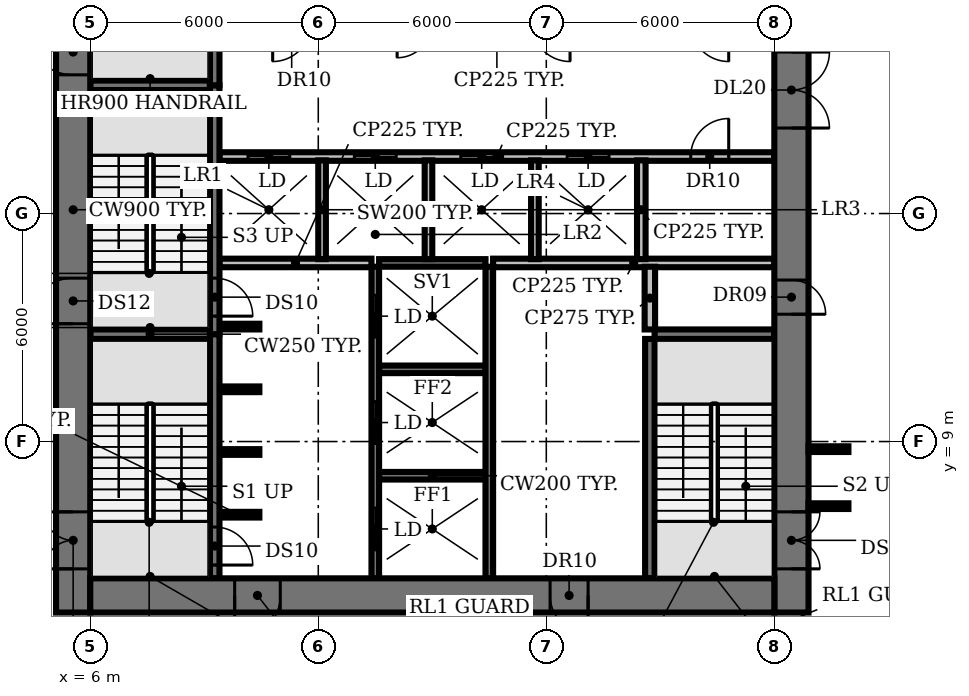
"""IFC4 building model, lengths in metres.
Left out: names, types, materials, properties, quantities, classifications, styles, units other than length and angle.
Written with IfcOpenShell. Run it as: python <this file> out.ifc"""

import sys

from ifc_helpers import new_model, si_unit, direction, frame, frame_2d, origin, place, context, subcontext, project, spatial, rectangle, extrude, element, fill, save


model = new_model("IFC4")
c1 = context("Model", 3, precision=1e-05, world=origin(), true_north=direction((0.0, 1.0)))
c2 = subcontext(c1, "Body", "Model", "MODEL_VIEW")
j1 = project(units=[si_unit("LENGTHUNIT", "METRE"), si_unit("PLANEANGLEUNIT", "RADIAN")], contexts=[c1])
p1 = place(None, origin())
s1 = spatial("IfcSite", under=j1, at=p1, CompositionType="ELEMENT")
p2 = place(p1, origin())
s2 = spatial("IfcBuilding", under=s1, at=p2, CompositionType="ELEMENT")
p3 = place(p2, frame((0.0, 0.0, 79.4)))
s3 = spatial("IfcBuildingStorey", under=s2, at=p3, CompositionType="ELEMENT", Elevation=79.4)
p4 = place(p3, frame((9.4, 7.075, 0.0), z_axis=(0.0, 0.0, 1.0), x_axis=(1.0, 0.0, 0.0)))
e1 = element("IfcWall", 1, at=p4, inside=s3, PredefinedType="SHEAR", context=c2, shape_type="SweptSolid", body=[
    extrude(rectangle(XDim=1.05, YDim=0.15, at=frame_2d((0.525, 0.0))), origin(), (0.0, 0.0, 1.0), 8.05),
])
p5 = place(p3, frame((13.6, 8.1, 0.0), z_axis=(0.0, 0.0, 1.0), x_axis=(1.0, 0.0, 0.0)))
e2 = element("IfcWall", 2, at=p5, inside=s3, PredefinedType="SHEAR", context=c2, shape_type="SweptSolid", body=[
    extrude(rectangle(XDim=2.8, YDim=0.2, at=frame_2d((1.4, 0.0))), origin(), (0.0, 0.0, 1.0), 8.05),
])
for number, where, z_axis, x_axis in (
    (3, (9.4, 8.725, 0.0), (0.0, 0.0, 1.0), (1.0, 0.0, 0.0)),
    (4, (9.4, 10.375, 0.0), (0.0, 0.0, 1.0), (1.0, 0.0, 0.0)),
):
    element("IfcWall", number, at=place(p3, frame(where, z_axis=z_axis, x_axis=x_axis)), inside=s3, PredefinedType="SHEAR", context=c2, shape_type="SweptSolid", body=[
        extrude(rectangle(XDim=1.05, YDim=0.15, at=frame_2d((0.525, 0.0))), origin(), (0.0, 0.0, 1.0), 8.05),
    ])
p6 = place(p3, frame((13.6, 10.9, 0.0), z_axis=(0.0, 0.0, 1.0), x_axis=(1.0, 0.0, 0.0)))
e5 = element("IfcWall", 5, at=p6, inside=s3, PredefinedType="SHEAR", context=c2, shape_type="SweptSolid", body=[
    extrude(rectangle(XDim=2.8, YDim=0.2, at=frame_2d((1.4, 0.0))), origin(), (0.0, 0.0, 1.0), 8.05),
])
for number, where, z_axis, x_axis in (
    (6, (6.0, 11.825, 0.0), (0.0, 0.0, 1.0), (1.0, 0.0, 0.0)),
    (7, (20.85, 11.825, 0.0), (0.0, 0.0, 1.0), (1.0, 0.0, 0.0)),
):
    element("IfcWall", number, at=place(p3, frame(where, z_axis=z_axis, x_axis=x_axis)), inside=s3, PredefinedType="SHEAR", context=c2, shape_type="SweptSolid", body=[
        extrude(rectangle(XDim=3.15, YDim=0.25, at=frame_2d((1.575, 0.0))), origin(), (0.0, 0.0, 1.0), 8.05),
    ])
p7 = place(p3, frame((9.4, 12.025, 0.0), z_axis=(0.0, 0.0, 1.0), x_axis=(1.0, 0.0, 0.0)))
e8 = element("IfcWall", 8, at=p7, inside=s3, PredefinedType="SHEAR", context=c2, shape_type="SweptSolid", body=[
    extrude(rectangle(XDim=1.05, YDim=0.15, at=frame_2d((0.525, 0.0))), origin(), (0.0, 0.0, 1.0), 8.05),
])
p8 = place(p3, frame((9.4, 13.7, 0.0), z_axis=(0.0, 0.0, 1.0), x_axis=(1.0, 0.0, 0.0)))
e9 = element("IfcWall", 9, at=p8, inside=s3, PredefinedType="PARTITIONING", context=c2, shape_type="SweptSolid", body=[
    extrude(rectangle(XDim=4.0, YDim=0.225, at=frame_2d((2.0, 0.0))), origin(), (0.0, 0.0, 1.0), 8.05),
])
p9 = place(p3, frame((13.6, 13.7, 0.0), z_axis=(0.0, 0.0, 1.0), x_axis=(1.0, 0.0, 0.0)))
e10 = element("IfcWall", 10, at=p9, inside=s3, PredefinedType="SHEAR", context=c2, shape_type="SweptSolid", body=[
    extrude(rectangle(XDim=2.8, YDim=0.2, at=frame_2d((1.4, 0.0))), origin(), (0.0, 0.0, 1.0), 8.05),
])
p10 = place(p3, frame((16.6, 13.7, 0.0), z_axis=(0.0, 0.0, 1.0), x_axis=(1.0, 0.0, 0.0)))
e11 = element("IfcWall", 11, at=p10, inside=s3, PredefinedType="PARTITIONING", context=c2, shape_type="SweptSolid", body=[
    extrude(rectangle(XDim=7.4, YDim=0.225, at=frame_2d((3.7, 0.0))), origin(), (0.0, 0.0, 1.0), 8.05),
])
p11 = place(p3, frame((9.4, 16.5, 0.0), z_axis=(0.0, 0.0, 1.0), x_axis=(1.0, 0.0, 0.0)))
e12 = element("IfcWall", 12, at=p11, inside=s3, PredefinedType="PARTITIONING", context=c2, shape_type="SweptSolid", body=[
    extrude(rectangle(XDim=14.6, YDim=0.225, at=frame_2d((7.3, 0.0))), origin(), (0.0, 0.0, 1.0), 8.05),
])
p12 = place(p11, frame((0.75, 0.0, 0.0)))
e13 = element("IfcOpeningElement", 13, at=p12, cuts=e12, PredefinedType="OPENING", context=c2, shape_type="SweptSolid", body=[
    extrude(rectangle(XDim=1.1, YDim=2.1, at=frame_2d((0.55, 1.05))), frame((0.0, 0.123, 0.0), z_axis=(0.0, -1.0, 0.0), x_axis=(1.0, 0.0, 0.0)), (0.0, 0.0, 1.0), 0.245),
])
p13 = place(p11, frame((3.55, 0.0, 0.0)))
e14 = element("IfcOpeningElement", 14, at=p13, cuts=e12, PredefinedType="OPENING", context=c2, shape_type="SweptSolid", body=[
    extrude(rectangle(XDim=1.1, YDim=2.1, at=frame_2d((0.55, 1.05))), frame((0.0, 0.123, 0.0), z_axis=(0.0, -1.0, 0.0), x_axis=(1.0, 0.0, 0.0)), (0.0, 0.0, 1.0), 0.245),
])
p14 = place(p11, frame((6.35, 0.0, 0.0)))
e15 = element("IfcOpeningElement", 15, at=p14, cuts=e12, PredefinedType="OPENING", context=c2, shape_type="SweptSolid", body=[
    extrude(rectangle(XDim=1.1, YDim=2.1, at=frame_2d((0.55, 1.05))), frame((0.0, 0.123, 0.0), z_axis=(0.0, -1.0, 0.0), x_axis=(1.0, 0.0, 0.0)), (0.0, 0.0, 1.0), 0.245),
])
p15 = place(p11, frame((9.15, 0.0, 0.0)))
e16 = element("IfcOpeningElement", 16, at=p15, cuts=e12, PredefinedType="OPENING", context=c2, shape_type="SweptSolid", body=[
    extrude(rectangle(XDim=1.1, YDim=2.1, at=frame_2d((0.55, 1.05))), frame((0.0, 0.123, 0.0), z_axis=(0.0, -1.0, 0.0), x_axis=(1.0, 0.0, 0.0)), (0.0, 0.0, 1.0), 0.245),
])
p16 = place(p11, frame((12.4, 0.0, 0.0)))
e17 = element("IfcOpeningElement", 17, at=p16, cuts=e12, PredefinedType="OPENING", context=c2, shape_type="SweptSolid", body=[
    extrude(rectangle(XDim=1.0, YDim=2.1, at=frame_2d((0.5, 1.05))), frame((0.0, 0.123, 0.0), z_axis=(0.0, -1.0, 0.0), x_axis=(1.0, 0.0, 0.0)), (0.0, 0.0, 1.0), 0.245),
])
p17 = place(p3, frame((6.0, 18.375, 0.0), z_axis=(0.0, 0.0, 1.0), x_axis=(1.0, 0.0, 0.0)))
e18 = element("IfcWall", 18, at=p17, inside=s3, PredefinedType="SHEAR", context=c2, shape_type="SweptSolid", body=[
    extrude(rectangle(XDim=3.15, YDim=0.25, at=frame_2d((1.575, 0.0))), origin(), (0.0, 0.0, 1.0), 8.05),
])
p18 = place(p3, frame((9.275, 11.825, 0.0), z_axis=(0.0, 0.0, 1.0), x_axis=(0.0, -1.0, 0.0)))
e19 = element("IfcWall", 19, at=p18, inside=s3, PredefinedType="SHEAR", context=c2, shape_type="SweptSolid", body=[
    extrude(rectangle(XDim=6.425, YDim=0.25, at=frame_2d((3.212, 0.0))), origin(), (0.0, 0.0, 1.0), 8.05),
])
p19 = place(p18, frame((5.075, 0.0, 0.0)))
e20 = element("IfcOpeningElement", 20, at=p19, cuts=e19, PredefinedType="OPENING", context=c2, shape_type="SweptSolid", body=[
    extrude(rectangle(XDim=1.0, YDim=2.1, at=frame_2d((0.5, 1.05))), frame((0.0, 0.135, 0.0), z_axis=(0.0, -1.0, 0.0), x_axis=(1.0, 0.0, 0.0)), (0.0, 0.0, 1.0), 0.27),
])
p20 = place(p3, frame((9.275, 18.375, 0.0), z_axis=(0.0, 0.0, 1.0), x_axis=(0.0, -1.0, 0.0)))
e21 = element("IfcWall", 21, at=p20, inside=s3, PredefinedType="SHEAR", context=c2, shape_type="SweptSolid", body=[
    extrude(rectangle(XDim=6.55, YDim=0.25, at=frame_2d((3.275, 0.0))), origin(), (0.0, 0.0, 1.0), 8.05),
])
p21 = place(p20, frame((5.075, 0.0, 0.0)))
e22 = element("IfcOpeningElement", 22, at=p21, cuts=e21, PredefinedType="OPENING", context=c2, shape_type="SweptSolid", body=[
    extrude(rectangle(XDim=1.0, YDim=2.1, at=frame_2d((0.5, 1.05))), frame((0.0, 0.135, 0.0), z_axis=(0.0, -1.0, 0.0), x_axis=(1.0, 0.0, 0.0)), (0.0, 0.0, 1.0), 0.27),
])
p22 = place(p3, frame((9.275, 18.375, 0.0), z_axis=(0.0, 0.0, 1.0), x_axis=(0.0, 1.0, 0.0)))
e23 = element("IfcWall", 23, at=p22, inside=s3, PredefinedType="SHEAR", context=c2, shape_type="SweptSolid", body=[
    extrude(rectangle(XDim=6.425, YDim=0.25, at=frame_2d((3.212, 0.0))), origin(), (0.0, 0.0, 1.0), 8.05),
])
p23 = place(p3, frame((12.1, 13.8, 0.0), z_axis=(0.0, 0.0, 1.0), x_axis=(0.0, 1.0, 0.0)))
e24 = element("IfcWall", 24, at=p23, inside=s3, PredefinedType="SOLIDWALL", context=c2, shape_type="SweptSolid", body=[
    extrude(rectangle(XDim=2.6, YDim=0.2, at=frame_2d((1.3, 0.0))), origin(), (0.0, 0.0, 1.0), 8.05),
])
p24 = place(p3, frame((13.5, 5.4, 0.0), z_axis=(0.0, 0.0, 1.0), x_axis=(0.0, 1.0, 0.0)))
e25 = element("IfcWall", 25, at=p24, inside=s3, PredefinedType="SHEAR", context=c2, shape_type="SweptSolid", body=[
    extrude(rectangle(XDim=8.2, YDim=0.2, at=frame_2d((4.1, 0.0))), origin(), (0.0, 0.0, 1.0), 8.05),
])
p25 = place(p24, frame((0.75, 0.0, 0.0)))
e26 = element("IfcOpeningElement", 26, at=p25, cuts=e25, PredefinedType="OPENING", context=c2, shape_type="SweptSolid", body=[
    extrude(rectangle(XDim=1.1, YDim=2.1, at=frame_2d((0.55, 1.05))), frame((0.0, 0.11, 0.0), z_axis=(0.0, -1.0, 0.0), x_axis=(1.0, 0.0, 0.0)), (0.0, 0.0, 1.0), 0.22),
])
p26 = place(p24, frame((3.55, 0.0, 0.0)))
e27 = element("IfcOpeningElement", 27, at=p26, cuts=e25, PredefinedType="OPENING", context=c2, shape_type="SweptSolid", body=[
    extrude(rectangle(XDim=1.1, YDim=2.1, at=frame_2d((0.55, 1.05))), frame((0.0, 0.11, 0.0), z_axis=(0.0, -1.0, 0.0), x_axis=(1.0, 0.0, 0.0)), (0.0, 0.0, 1.0), 0.22),
])
p27 = place(p24, frame((6.35, 0.0, 0.0)))
e28 = element("IfcOpeningElement", 28, at=p27, cuts=e25, PredefinedType="OPENING", context=c2, shape_type="SweptSolid", body=[
    extrude(rectangle(XDim=1.1, YDim=2.1, at=frame_2d((0.55, 1.05))), frame((0.0, 0.11, 0.0), z_axis=(0.0, -1.0, 0.0), x_axis=(1.0, 0.0, 0.0)), (0.0, 0.0, 1.0), 0.22),
])
p28 = place(p3, frame((14.9, 13.8, 0.0), z_axis=(0.0, 0.0, 1.0), x_axis=(0.0, 1.0, 0.0)))
e29 = element("IfcWall", 29, at=p28, inside=s3, PredefinedType="SOLIDWALL", context=c2, shape_type="SweptSolid", body=[
    extrude(rectangle(XDim=2.6, YDim=0.2, at=frame_2d((1.3, 0.0))), origin(), (0.0, 0.0, 1.0), 8.05),
])
p29 = place(p3, frame((16.5, 5.4, 0.0), z_axis=(0.0, 0.0, 1.0), x_axis=(0.0, 1.0, 0.0)))
e30 = element("IfcWall", 30, at=p29, inside=s3, PredefinedType="SHEAR", context=c2, shape_type="SweptSolid", body=[
    extrude(rectangle(XDim=8.2, YDim=0.2, at=frame_2d((4.1, 0.0))), origin(), (0.0, 0.0, 1.0), 8.05),
])
p30 = place(p3, frame((17.7, 13.8, 0.0), z_axis=(0.0, 0.0, 1.0), x_axis=(0.0, 1.0, 0.0)))
e31 = element("IfcWall", 31, at=p30, inside=s3, PredefinedType="SOLIDWALL", context=c2, shape_type="SweptSolid", body=[
    extrude(rectangle(XDim=2.6, YDim=0.2, at=frame_2d((1.3, 0.0))), origin(), (0.0, 0.0, 1.0), 8.05),
])
p31 = place(p3, frame((20.5, 13.8, 0.0), z_axis=(0.0, 0.0, 1.0), x_axis=(0.0, 1.0, 0.0)))
e32 = element("IfcWall", 32, at=p31, inside=s3, PredefinedType="PARTITIONING", context=c2, shape_type="SweptSolid", body=[
    extrude(rectangle(XDim=2.6, YDim=0.225, at=frame_2d((1.3, 0.0))), origin(), (0.0, 0.0, 1.0), 8.05),
])
p32 = place(p3, frame((20.725, 5.4, 0.0), z_axis=(0.0, 0.0, 1.0), x_axis=(0.0, 1.0, 0.0)))
e33 = element("IfcWall", 33, at=p32, inside=s3, PredefinedType="SHEAR", context=c2, shape_type="SweptSolid", body=[
    extrude(rectangle(XDim=6.3, YDim=0.25, at=frame_2d((3.15, 0.0))), origin(), (0.0, 0.0, 1.0), 8.05),
])
p33 = place(p3, frame((20.725, 11.95, 0.0), z_axis=(0.0, 0.0, 1.0), x_axis=(0.0, 1.0, 0.0)))
e34 = element("IfcWall", 34, at=p33, inside=s3, PredefinedType="PARTITIONING", context=c2, shape_type="SweptSolid", body=[
    extrude(rectangle(XDim=1.65, YDim=0.275, at=frame_2d((0.825, 0.0))), origin(), (0.0, 0.0, 1.0), 8.05),
])
p34 = place(p3, frame((5.55, 4.5, 0.0), z_axis=(0.0, 0.0, 1.0), x_axis=(0.0, 1.0, 0.0)))
e35 = element("IfcWall", 35, at=p34, inside=s3, PredefinedType="SHEAR", context=c2, shape_type="SweptSolid", body=[
    extrude(rectangle(XDim=21.2, YDim=0.9, at=frame_2d((10.6, 0.0))), origin(), (0.0, 0.0, 1.0), 8.05),
])
p35 = place(p34, frame((1.15, 0.0, 0.0)))
e36 = element("IfcOpeningElement", 36, at=p35, cuts=e35, PredefinedType="OPENING", context=c2, shape_type="SweptSolid", body=[
    extrude(rectangle(XDim=1.5, YDim=2.1, at=frame_2d((0.75, 1.05))), frame((0.0, 0.46, 0.0), z_axis=(0.0, -1.0, 0.0), x_axis=(1.0, 0.0, 0.0)), (0.0, 0.0, 1.0), 0.92),
])
p36 = place(p34, frame((7.6, 0.0, 0.0)))
e37 = element("IfcOpeningElement", 37, at=p36, cuts=e35, PredefinedType="OPENING", context=c2, shape_type="SweptSolid", body=[
    extrude(rectangle(XDim=1.2, YDim=2.1, at=frame_2d((0.6, 1.05))), frame((0.0, 0.46, 0.0), z_axis=(0.0, -1.0, 0.0), x_axis=(1.0, 0.0, 0.0)), (0.0, 0.0, 1.0), 0.92),
])
p37 = place(p34, frame((14.15, 0.0, 0.0)))
e38 = element("IfcOpeningElement", 38, at=p37, cuts=e35, PredefinedType="OPENING", context=c2, shape_type="SweptSolid", body=[
    extrude(rectangle(XDim=1.2, YDim=2.1, at=frame_2d((0.6, 1.05))), frame((0.0, 0.46, 0.0), z_axis=(0.0, -1.0, 0.0), x_axis=(1.0, 0.0, 0.0)), (0.0, 0.0, 1.0), 0.92),
])
p38 = place(p3, frame((24.45, 25.7, 0.0), z_axis=(0.0, 0.0, 1.0), x_axis=(0.0, -1.0, 0.0)))
e39 = element("IfcWall", 39, at=p38, inside=s3, PredefinedType="SHEAR", context=c2, shape_type="SweptSolid", body=[
    extrude(rectangle(XDim=21.2, YDim=0.9, at=frame_2d((10.6, 0.0))), origin(), (0.0, 0.0, 1.0), 8.05),
])
p39 = place(p38, frame((18.55, 0.0, 0.0)))
e40 = element("IfcOpeningElement", 40, at=p39, cuts=e39, PredefinedType="OPENING", context=c2, shape_type="SweptSolid", body=[
    extrude(rectangle(XDim=1.5, YDim=2.1, at=frame_2d((0.75, 1.05))), frame((0.0, 0.46, 0.0), z_axis=(0.0, -1.0, 0.0), x_axis=(1.0, 0.0, 0.0)), (0.0, 0.0, 1.0), 0.92),
])
p40 = place(p38, frame((12.45, 0.0, 0.0)))
e41 = element("IfcOpeningElement", 41, at=p40, cuts=e39, PredefinedType="OPENING", context=c2, shape_type="SweptSolid", body=[
    extrude(rectangle(XDim=0.9, YDim=2.1, at=frame_2d((0.45, 1.05))), frame((0.0, 0.46, 0.0), z_axis=(0.0, -1.0, 0.0), x_axis=(1.0, 0.0, 0.0)), (0.0, 0.0, 1.0), 0.92),
])
p41 = place(p38, frame((6.45, 0.0, 0.0)))
e42 = element("IfcOpeningElement", 42, at=p41, cuts=e39, PredefinedType="OPENING", context=c2, shape_type="SweptSolid", body=[
    extrude(rectangle(XDim=2.0, YDim=2.1, at=frame_2d((1.0, 1.05))), frame((0.0, 0.46, 0.0), z_axis=(0.0, -1.0, 0.0), x_axis=(1.0, 0.0, 0.0)), (0.0, 0.0, 1.0), 0.92),
])
p42 = place(p3, frame((24.0, 4.95, 0.0), z_axis=(0.0, 0.0, 1.0), x_axis=(-1.0, 0.0, 0.0)))
e43 = element("IfcWall", 43, at=p42, inside=s3, PredefinedType="SHEAR", context=c2, shape_type="SweptSolid", body=[
    extrude(rectangle(XDim=18.0, YDim=0.9, at=frame_2d((9.0, 0.0))), origin(), (0.0, 0.0, 1.0), 8.05),
])
p43 = place(p42, frame((13.0, 0.0, 0.0)))
e44 = element("IfcOpeningElement", 44, at=p43, cuts=e43, PredefinedType="OPENING", context=c2, shape_type="SweptSolid", body=[
    extrude(rectangle(XDim=1.2, YDim=2.1, at=frame_2d((0.6, 1.05))), frame((0.0, 0.46, 0.0), z_axis=(0.0, -1.0, 0.0), x_axis=(1.0, 0.0, 0.0)), (0.0, 0.0, 1.0), 0.92),
])
p44 = place(p42, frame((4.9, 0.0, 0.0)))
e45 = element("IfcOpeningElement", 45, at=p44, cuts=e43, PredefinedType="OPENING", context=c2, shape_type="SweptSolid", body=[
    extrude(rectangle(XDim=1.0, YDim=2.1, at=frame_2d((0.5, 1.05))), frame((0.0, 0.46, 0.0), z_axis=(0.0, -1.0, 0.0), x_axis=(1.0, 0.0, 0.0)), (0.0, 0.0, 1.0), 0.92),
])
for number, where, z_axis, x_axis in (
    (46, (24.9, 7.3, 0.0), (0.0, 0.0, 1.0), (1.0, 0.0, 0.0)),
    (47, (24.9, 8.8, 0.0), (0.0, 0.0, 1.0), (1.0, 0.0, 0.0)),
):
    element("IfcWall", number, at=place(p3, frame(where, z_axis=z_axis, x_axis=x_axis)), inside=s3, PredefinedType="PARTITIONING", context=c2, shape_type="SweptSolid", body=[
        extrude(rectangle(XDim=1.05, YDim=0.15, at=frame_2d((0.525, 0.0))), origin(), (0.0, 0.0, 1.0), 6.33),
    ])
p45 = place(p12, origin())
e48 = element("IfcDoor", 48, at=p45, inside=s3, OperationType="DOUBLE_DOOR_SLIDING", PredefinedType="DOOR", context=c2, shape_type="SweptSolid", body=[
    extrude(rectangle(XDim=1.1, YDim=2.1, at=frame_2d((0.55, 1.05))), frame((0.0, 0.025, 0.0), z_axis=(0.0, -1.0, 0.0), x_axis=(1.0, 0.0, 0.0)), (0.0, 0.0, 1.0), 0.05),
])
fill(e13, e48)
p46 = place(p13, origin())
e49 = element("IfcDoor", 49, at=p46, inside=s3, OperationType="DOUBLE_DOOR_SLIDING", PredefinedType="DOOR", context=c2, shape_type="SweptSolid", body=[
    extrude(rectangle(XDim=1.1, YDim=2.1, at=frame_2d((0.55, 1.05))), frame((0.0, 0.025, 0.0), z_axis=(0.0, -1.0, 0.0), x_axis=(1.0, 0.0, 0.0)), (0.0, 0.0, 1.0), 0.05),
])
fill(e14, e49)
p47 = place(p14, origin())
e50 = element("IfcDoor", 50, at=p47, inside=s3, OperationType="DOUBLE_DOOR_SLIDING", PredefinedType="DOOR", context=c2, shape_type="SweptSolid", body=[
    extrude(rectangle(XDim=1.1, YDim=2.1, at=frame_2d((0.55, 1.05))), frame((0.0, 0.025, 0.0), z_axis=(0.0, -1.0, 0.0), x_axis=(1.0, 0.0, 0.0)), (0.0, 0.0, 1.0), 0.05),
])
fill(e15, e50)
p48 = place(p15, origin())
e51 = element("IfcDoor", 51, at=p48, inside=s3, OperationType="DOUBLE_DOOR_SLIDING", PredefinedType="DOOR", context=c2, shape_type="SweptSolid", body=[
    extrude(rectangle(XDim=1.1, YDim=2.1, at=frame_2d((0.55, 1.05))), frame((0.0, 0.025, 0.0), z_axis=(0.0, -1.0, 0.0), x_axis=(1.0, 0.0, 0.0)), (0.0, 0.0, 1.0), 0.05),
])
fill(e16, e51)
p49 = place(p16, origin())
e52 = element("IfcDoor", 52, at=p49, inside=s3, OperationType="SINGLE_SWING_RIGHT", PredefinedType="DOOR", context=c2, shape_type="SweptSolid", body=[
    extrude(rectangle(XDim=1.0, YDim=2.1, at=frame_2d((0.5, 1.05))), frame((0.0, 0.025, 0.0), z_axis=(0.0, -1.0, 0.0), x_axis=(1.0, 0.0, 0.0)), (0.0, 0.0, 1.0), 0.05),
])
fill(e17, e52)
p50 = place(p19, origin())
e53 = element("IfcDoor", 53, at=p50, inside=s3, OperationType="SINGLE_SWING_RIGHT", PredefinedType="DOOR", context=c2, shape_type="SweptSolid", body=[
    extrude(rectangle(XDim=1.0, YDim=2.1, at=frame_2d((0.5, 1.05))), frame((0.0, 0.025, 0.0), z_axis=(0.0, -1.0, 0.0), x_axis=(1.0, 0.0, 0.0)), (0.0, 0.0, 1.0), 0.05),
])
fill(e20, e53)
p51 = place(p21, origin())
e54 = element("IfcDoor", 54, at=p51, inside=s3, OperationType="SINGLE_SWING_RIGHT", PredefinedType="DOOR", context=c2, shape_type="SweptSolid", body=[
    extrude(rectangle(XDim=1.0, YDim=2.1, at=frame_2d((0.5, 1.05))), frame((0.0, 0.025, 0.0), z_axis=(0.0, -1.0, 0.0), x_axis=(1.0, 0.0, 0.0)), (0.0, 0.0, 1.0), 0.05),
])
fill(e22, e54)
p52 = place(p25, origin())
e55 = element("IfcDoor", 55, at=p52, inside=s3, OperationType="DOUBLE_DOOR_SLIDING", PredefinedType="DOOR", context=c2, shape_type="SweptSolid", body=[
    extrude(rectangle(XDim=1.1, YDim=2.1, at=frame_2d((0.55, 1.05))), frame((0.0, 0.025, 0.0), z_axis=(0.0, -1.0, 0.0), x_axis=(1.0, 0.0, 0.0)), (0.0, 0.0, 1.0), 0.05),
])
fill(e26, e55)
p53 = place(p26, origin())
e56 = element("IfcDoor", 56, at=p53, inside=s3, OperationType="DOUBLE_DOOR_SLIDING", PredefinedType="DOOR", context=c2, shape_type="SweptSolid", body=[
    extrude(rectangle(XDim=1.1, YDim=2.1, at=frame_2d((0.55, 1.05))), frame((0.0, 0.025, 0.0), z_axis=(0.0, -1.0, 0.0), x_axis=(1.0, 0.0, 0.0)), (0.0, 0.0, 1.0), 0.05),
])
fill(e27, e56)
p54 = place(p27, origin())
e57 = element("IfcDoor", 57, at=p54, inside=s3, OperationType="DOUBLE_DOOR_SLIDING", PredefinedType="DOOR", context=c2, shape_type="SweptSolid", body=[
    extrude(rectangle(XDim=1.1, YDim=2.1, at=frame_2d((0.55, 1.05))), frame((0.0, 0.025, 0.0), z_axis=(0.0, -1.0, 0.0), x_axis=(1.0, 0.0, 0.0)), (0.0, 0.0, 1.0), 0.05),
])
fill(e28, e57)
p55 = place(p35, origin())
e58 = element("IfcDoor", 58, at=p55, inside=s3, OperationType="DOUBLE_DOOR_SINGLE_SWING", PredefinedType="DOOR", context=c2, shape_type="SweptSolid", body=[
    extrude(rectangle(XDim=1.5, YDim=2.1, at=frame_2d((0.75, 1.05))), frame((0.0, 0.025, 0.0), z_axis=(0.0, -1.0, 0.0), x_axis=(1.0, 0.0, 0.0)), (0.0, 0.0, 1.0), 0.05),
])
fill(e36, e58)
p56 = place(p36, origin())
e59 = element("IfcDoor", 59, at=p56, inside=s3, OperationType="SINGLE_SWING_LEFT", PredefinedType="DOOR", context=c2, shape_type="SweptSolid", body=[
    extrude(rectangle(XDim=1.2, YDim=2.1, at=frame_2d((0.6, 1.05))), frame((0.0, 0.025, 0.0), z_axis=(0.0, -1.0, 0.0), x_axis=(1.0, 0.0, 0.0)), (0.0, 0.0, 1.0), 0.05),
])
fill(e37, e59)
p57 = place(p37, origin())
e60 = element("IfcDoor", 60, at=p57, inside=s3, OperationType="SINGLE_SWING_RIGHT", PredefinedType="DOOR", context=c2, shape_type="SweptSolid", body=[
    extrude(rectangle(XDim=1.2, YDim=2.1, at=frame_2d((0.6, 1.05))), frame((0.0, 0.025, 0.0), z_axis=(0.0, -1.0, 0.0), x_axis=(1.0, 0.0, 0.0)), (0.0, 0.0, 1.0), 0.05),
])
fill(e38, e60)
p58 = place(p39, origin())
e61 = element("IfcDoor", 61, at=p58, inside=s3, OperationType="DOUBLE_DOOR_SINGLE_SWING", PredefinedType="DOOR", context=c2, shape_type="SweptSolid", body=[
    extrude(rectangle(XDim=1.5, YDim=2.1, at=frame_2d((0.75, 1.05))), frame((0.0, 0.025, 0.0), z_axis=(0.0, -1.0, 0.0), x_axis=(1.0, 0.0, 0.0)), (0.0, 0.0, 1.0), 0.05),
])
fill(e40, e61)
p59 = place(p40, origin())
e62 = element("IfcDoor", 62, at=p59, inside=s3, OperationType="SINGLE_SWING_RIGHT", PredefinedType="DOOR", context=c2, shape_type="SweptSolid", body=[
    extrude(rectangle(XDim=0.9, YDim=2.1, at=frame_2d((0.45, 1.05))), frame((0.0, -0.39, 0.0), z_axis=(0.0, -1.0, 0.0), x_axis=(1.0, 0.0, 0.0)), (0.0, 0.0, 1.0), 0.05),
])
fill(e41, e62)
p60 = place(p41, origin())
e63 = element("IfcDoor", 63, at=p60, inside=s3, OperationType="DOUBLE_DOOR_SINGLE_SWING", PredefinedType="DOOR", context=c2, shape_type="SweptSolid", body=[
    extrude(rectangle(XDim=2.0, YDim=2.1, at=frame_2d((1.0, 1.05))), frame((0.0, 0.025, 0.0), z_axis=(0.0, -1.0, 0.0), x_axis=(1.0, 0.0, 0.0)), (0.0, 0.0, 1.0), 0.05),
])
fill(e42, e63)
p61 = place(p43, origin())
e64 = element("IfcDoor", 64, at=p61, inside=s3, OperationType="SINGLE_SWING_RIGHT", PredefinedType="DOOR", context=c2, shape_type="SweptSolid", body=[
    extrude(rectangle(XDim=1.2, YDim=2.1, at=frame_2d((0.6, 1.05))), frame((0.0, 0.025, 0.0), z_axis=(0.0, -1.0, 0.0), x_axis=(1.0, 0.0, 0.0)), (0.0, 0.0, 1.0), 0.05),
])
fill(e44, e64)
p62 = place(p44, origin())
e65 = element("IfcDoor", 65, at=p62, inside=s3, OperationType="SINGLE_SWING_LEFT", PredefinedType="DOOR", context=c2, shape_type="SweptSolid", body=[
    extrude(rectangle(XDim=1.0, YDim=2.1, at=frame_2d((0.5, 1.05))), frame((0.0, -0.39, 0.0), z_axis=(0.0, -1.0, 0.0), x_axis=(1.0, 0.0, 0.0)), (0.0, 0.0, 1.0), 0.05),
])
fill(e45, e65)
save(model, sys.argv[1])
